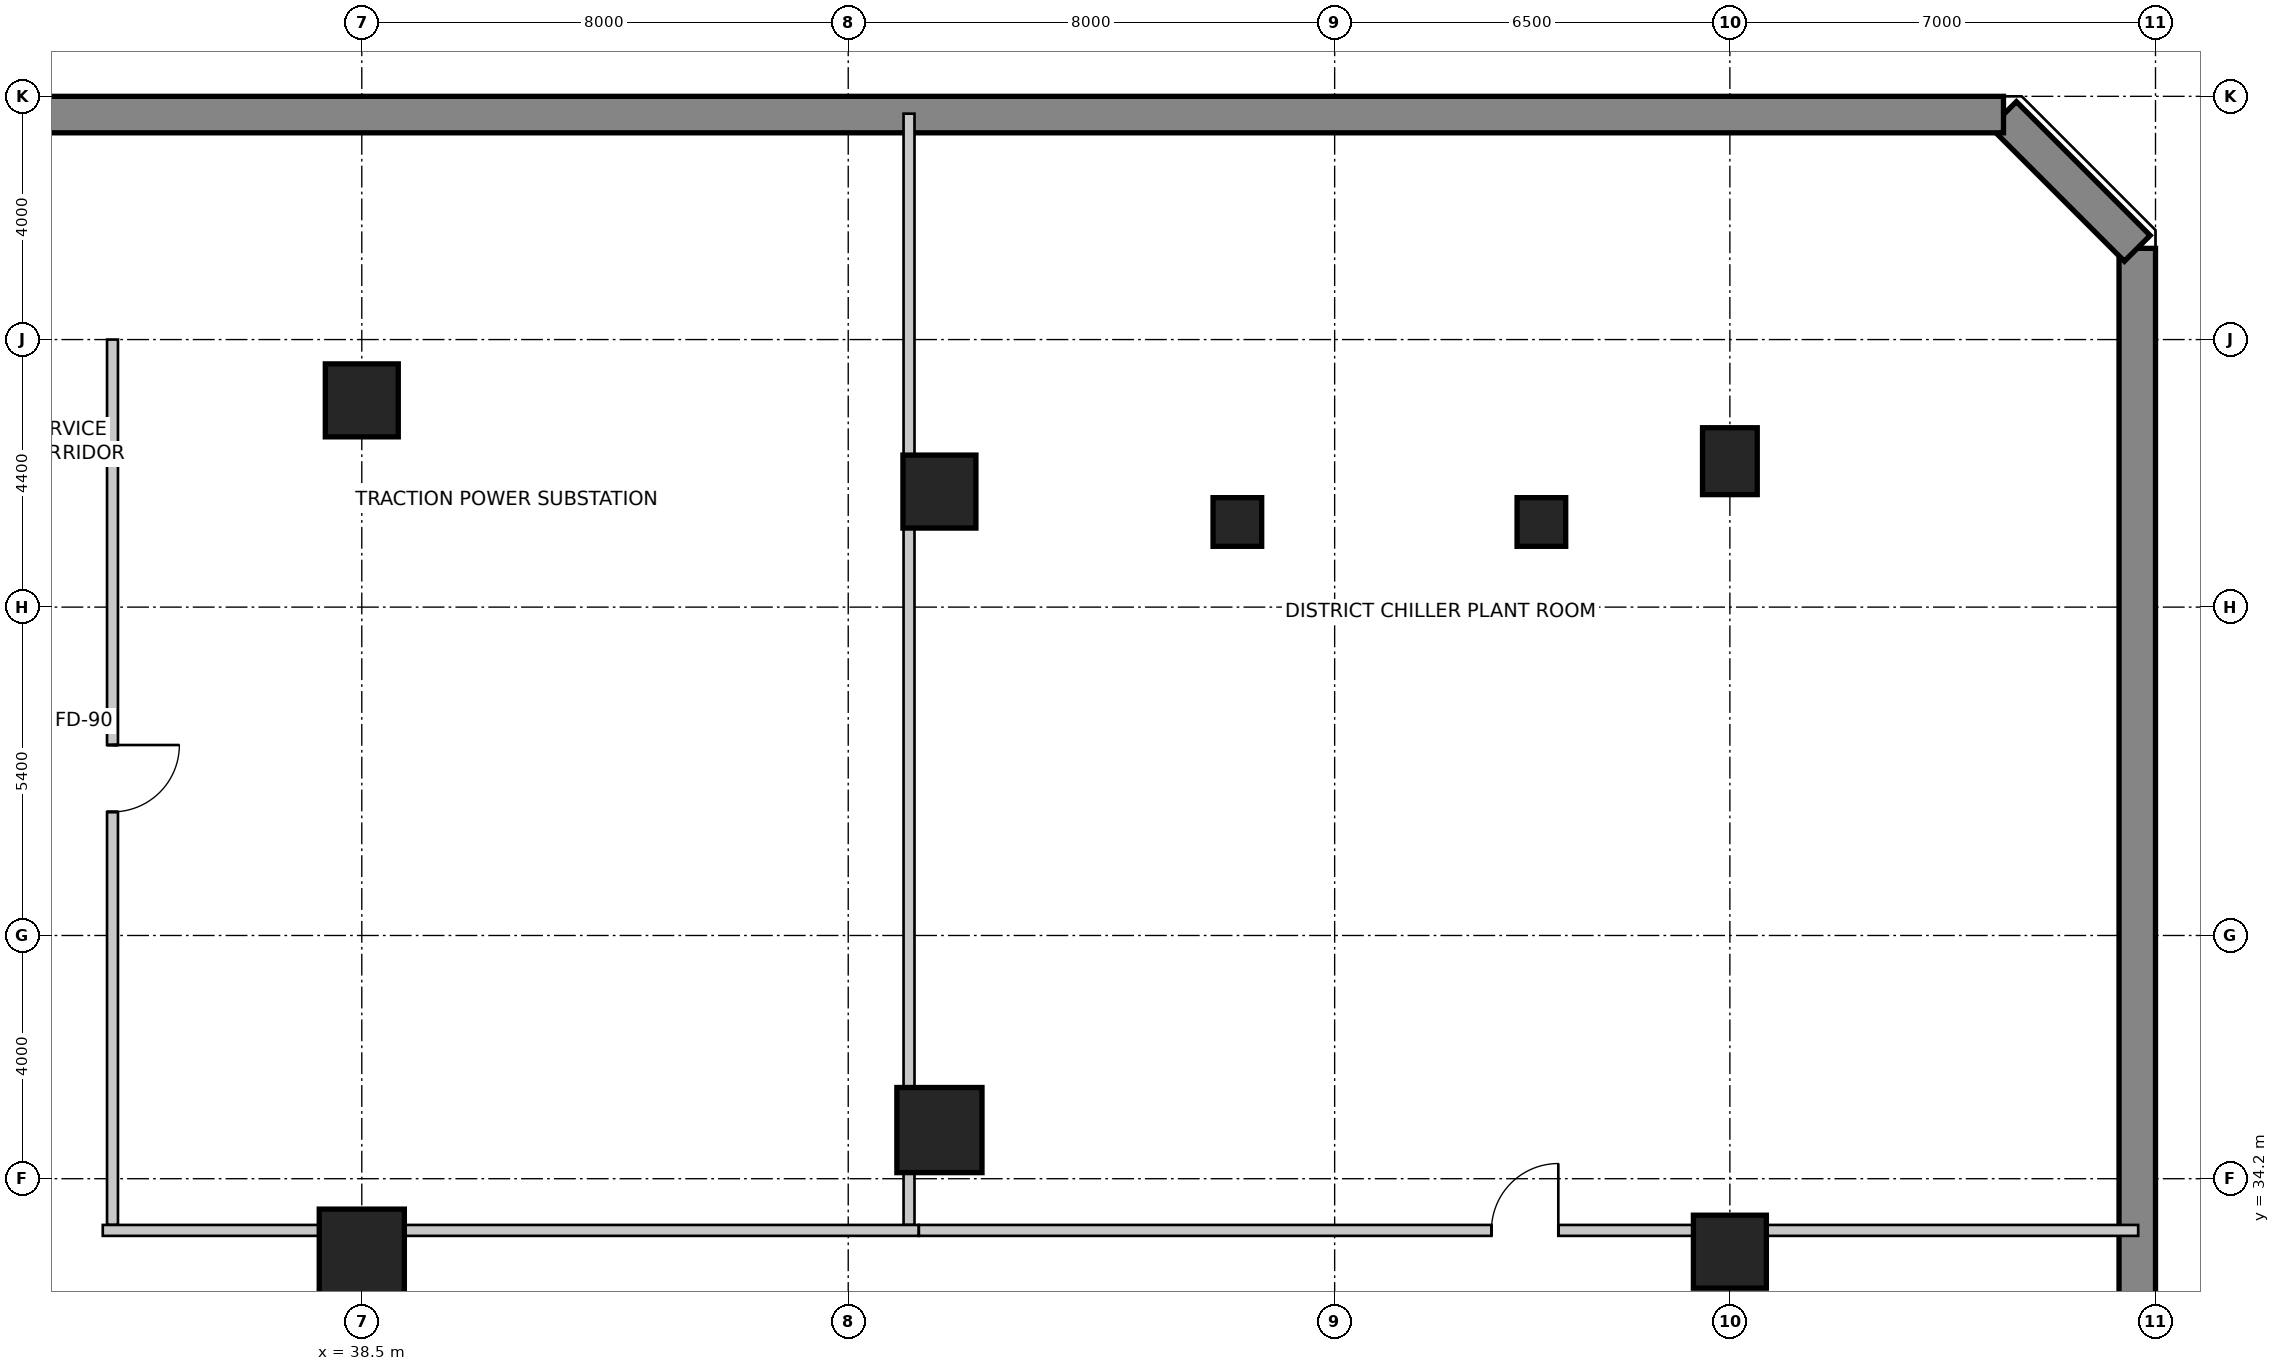
"""IFC4 building model, lengths in metres.
Left out: names, types, materials, properties, quantities, classifications, styles, units other than length and angle.
Written with IfcOpenShell. Run it as: python <this file> out.ifc"""

import sys

from ifc_helpers import new_model, si_unit, direction, frame, frame_2d, origin, origin_2d, place, context, subcontext, project, spatial, rectangle, extrude, source, transform, mapped, element, fill, save


model = new_model("IFC4")
c1 = context("Model", 3, precision=1e-05, world=origin(), true_north=direction((0.0, 1.0)))
c2 = subcontext(c1, "Body", "Model", "MODEL_VIEW")
j1 = project(units=[si_unit("LENGTHUNIT", "METRE"), si_unit("PLANEANGLEUNIT", "RADIAN")], contexts=[c1])
p1 = place(None, origin())
s1 = spatial("IfcSite", under=j1, at=p1, CompositionType="ELEMENT")
p2 = place(p1, origin())
s2 = spatial("IfcBuilding", under=s1, at=p2, CompositionType="ELEMENT")
p3 = place(p2, frame((0.0, 0.0, -11.2)))
s3 = spatial("IfcBuildingStorey", under=s2, at=p3, CompositionType="ELEMENT", Elevation=-11.2)
p4 = place(p3, frame((67.7, 4.5, 0.0), z_axis=(0.0, 0.0, 1.0), x_axis=(0.0, 1.0, 0.0)))
e1 = element("IfcWall", 1, at=p4, inside=s3, PredefinedType="SHEAR", context=c2, shape_type="SweptSolid", body=[
    extrude(rectangle(XDim=45.0, YDim=0.6, at=frame_2d((22.5, 0.0))), origin(), (0.0, 0.0, 1.0), 5.8),
])
p5 = place(p3, frame((67.7, 49.5, 0.0), z_axis=(0.0, 0.0, 1.0), x_axis=(-0.707106781187, 0.707106781187, 0.0)))
e2 = element("IfcWall", 2, at=p5, inside=s3, PredefinedType="SHEAR", context=c2, shape_type="SweptSolid", body=[
    extrude(rectangle(XDim=3.111, YDim=0.6, at=frame_2d((1.556, 0.0))), origin(), (0.0, 0.0, 1.0), 5.8),
])
p6 = place(p3, frame((65.5, 51.7, 0.0), z_axis=(0.0, 0.0, 1.0), x_axis=(-1.0, 0.0, 0.0)))
e3 = element("IfcWall", 3, at=p6, inside=s3, PredefinedType="SHEAR", context=c2, shape_type="SweptSolid", body=[
    extrude(rectangle(XDim=61.0, YDim=0.6, at=frame_2d((30.5, 0.0))), origin(), (0.0, 0.0, 1.0), 5.8),
])
m1 = source(origin(), c2, "Body", "SweptSolid", [
    extrude(rectangle(XDim=1.4, YDim=1.4, at=origin_2d()), origin(), (0.0, 0.0, 1.0), 5.8),
])
for number, where, z_axis, x_axis in (
    (4, (38.5, 33.0, 0.0), (0.0, 0.0, 1.0), (1.0, 0.0, 0.0)),
    (5, (48.0, 35.0, 0.0), (0.0, 0.0, 1.0), (1.0, 0.0, 0.0)),
):
    element("IfcColumn", number, at=place(p3, frame(where, z_axis=z_axis, x_axis=x_axis)), inside=s3, PredefinedType="COLUMN", context=c2, shape_type="MappedRepresentation", body=[
        mapped(m1, transform((0.0, 0.0, 0.0), scale=1.0)),
    ])
m2 = source(origin(), c2, "Body", "SweptSolid", [
    extrude(rectangle(XDim=1.2, YDim=1.2, at=origin_2d()), origin(), (0.0, 0.0, 1.0), 5.8),
])
for number, where, z_axis, x_axis in (
    (6, (61.0, 33.0, 0.0), (0.0, 0.0, 1.0), (1.0, 0.0, 0.0)),
    (7, (38.5, 47.0, 0.0), (0.0, 0.0, 1.0), (1.0, 0.0, 0.0)),
    (8, (48.0, 45.5, 0.0), (0.0, 0.0, 1.0), (1.0, 0.0, 0.0)),
):
    element("IfcColumn", number, at=place(p3, frame(where, z_axis=z_axis, x_axis=x_axis)), inside=s3, PredefinedType="COLUMN", context=c2, shape_type="MappedRepresentation", body=[
        mapped(m2, transform((0.0, 0.0, 0.0), scale=1.0)),
    ])
m3 = source(origin(), c2, "Body", "SweptSolid", [
    extrude(rectangle(XDim=0.9, YDim=1.1, at=origin_2d()), origin(), (0.0, 0.0, 1.0), 5.8),
])
p7 = place(p3, frame((61.0, 46.0, 0.0), z_axis=(0.0, 0.0, 1.0), x_axis=(1.0, 0.0, 0.0)))
e9 = element("IfcColumn", 9, at=p7, inside=s3, PredefinedType="COLUMN", context=c2, shape_type="MappedRepresentation", body=[
    mapped(m3, transform((0.0, 0.0, 0.0), scale=1.0)),
])
m4 = source(origin(), c2, "Body", "SweptSolid", [
    extrude(rectangle(XDim=0.8, YDim=0.8, at=origin_2d()), origin(), (0.0, 0.0, 1.0), 5.8),
])
for number, where, z_axis, x_axis in (
    (10, (52.9, 45.0, 0.0), (0.0, 0.0, 1.0), (1.0, 0.0, 0.0)),
    (11, (57.9, 45.0, 0.0), (0.0, 0.0, 1.0), (1.0, 0.0, 0.0)),
):
    element("IfcColumn", number, at=place(p3, frame(where, z_axis=z_axis, x_axis=x_axis)), inside=s3, PredefinedType="COLUMN", context=c2, shape_type="MappedRepresentation", body=[
        mapped(m4, transform((0.0, 0.0, 0.0), scale=1.0)),
    ])
p8 = place(p3, frame((34.24, 33.35, 0.0), z_axis=(0.0, 0.0, 1.0), x_axis=(1.0, 0.0, 0.0)))
e12 = element("IfcWall", 12, at=p8, inside=s3, PredefinedType="PARTITIONING", context=c2, shape_type="SweptSolid", body=[
    extrude(rectangle(XDim=13.42, YDim=0.18, at=frame_2d((6.71, 0.0))), origin(), (0.0, 0.0, 1.0), 3.672),
])
p9 = place(p3, frame((47.662, 33.35, 0.0), z_axis=(0.0, 0.0, 1.0), x_axis=(1.0, 0.0, 0.0)))
e13 = element("IfcWall", 13, at=p9, inside=s3, PredefinedType="PARTITIONING", context=c2, shape_type="SweptSolid", body=[
    extrude(rectangle(XDim=20.053, YDim=0.18, at=frame_2d((10.026, 0.0))), origin(), (0.0, 0.0, 1.0), 3.672),
])
m5 = source(origin(), c2, "Body", "SweptSolid", [
    extrude(rectangle(XDim=1.1, YDim=2.15, at=frame_2d((0.55, 1.075))), frame((0.0, 0.1, 0.0), z_axis=(0.0, -1.0, 0.0), x_axis=(1.0, 0.0, 0.0)), (0.0, 0.0, 1.0), 0.2),
])
p10 = place(p9, frame((9.417, 0.0, 0.0)))
e14 = element("IfcOpeningElement", 14, at=p10, cuts=e13, PredefinedType="OPENING", context=c2, shape_type="MappedRepresentation", body=[
    mapped(m5, transform((0.0, 0.0, 0.0), scale=1.0)),
])
p11 = place(p3, frame((34.4, 48.0, 0.0), z_axis=(0.0, 0.0, 1.0), x_axis=(0.0, -1.0, 0.0)))
e15 = element("IfcWall", 15, at=p11, inside=s3, PredefinedType="PARTITIONING", context=c2, shape_type="SweptSolid", body=[
    extrude(rectangle(XDim=14.556, YDim=0.18, at=frame_2d((7.278, 0.0))), origin(), (0.0, 0.0, 1.0), 4.522),
])
p12 = place(p11, frame((6.668, 0.0, 0.0)))
e16 = element("IfcOpeningElement", 16, at=p12, cuts=e15, PredefinedType="OPENING", context=c2, shape_type="MappedRepresentation", body=[
    mapped(m5, transform((0.0, 0.0, 0.0), scale=1.0)),
])
p13 = place(p3, frame((47.5, 51.715, 0.0), z_axis=(0.0, 0.0, 1.0), x_axis=(0.0, -1.0, 0.0)))
e17 = element("IfcWall", 17, at=p13, inside=s3, PredefinedType="PARTITIONING", context=c2, shape_type="SweptSolid", body=[
    extrude(rectangle(XDim=18.271, YDim=0.18, at=frame_2d((9.135, 0.0))), origin(), (0.0, 0.0, 1.0), 3.672),
])
m6 = source(origin(), c2, "Body", "SweptSolid", [
    extrude(rectangle(XDim=1.1, YDim=2.15, at=frame_2d((0.55, 1.075))), frame((0.0, 0.025, 0.0), z_axis=(0.0, -1.0, 0.0), x_axis=(1.0, 0.0, 0.0)), (0.0, 0.0, 1.0), 0.05),
])
p14 = place(p12, origin())
e18 = element("IfcDoor", 18, at=p14, inside=s3, OperationType="SINGLE_SWING_LEFT", PredefinedType="DOOR", context=c2, shape_type="MappedRepresentation", body=[
    mapped(m6, transform((0.0, 0.0, 0.0), scale=1.0)),
])
fill(e16, e18)
p15 = place(p10, origin())
e19 = element("IfcDoor", 19, at=p15, inside=s3, OperationType="SINGLE_SWING_RIGHT", PredefinedType="DOOR", context=c2, shape_type="MappedRepresentation", body=[
    mapped(m6, transform((0.0, 0.0, 0.0), scale=1.0)),
])
fill(e14, e19)
save(model, sys.argv[1])
